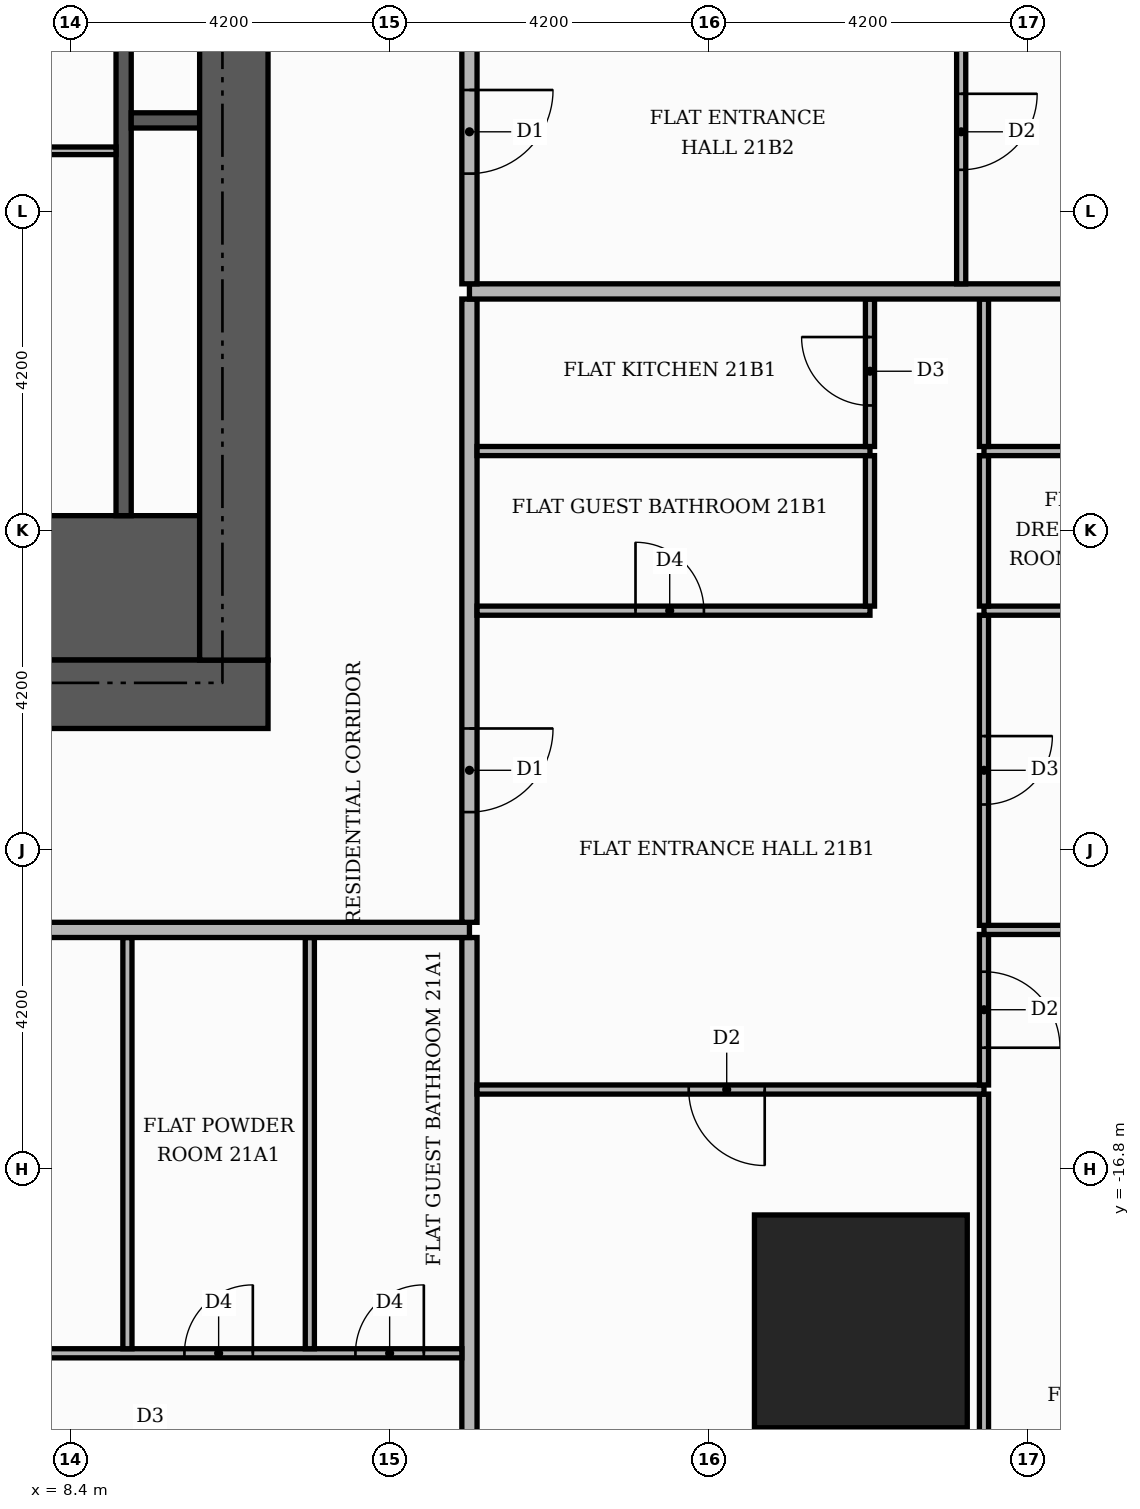
"""IFC4 building model, lengths in metres.
Left out: names, types, materials, properties, quantities, classifications, styles, units other than length and angle.
Written with IfcOpenShell. Run it as: python <this file> out.ifc"""

import sys

from ifc_helpers import new_model, si_unit, direction, frame, frame_2d, origin, origin_2d, place, context, subcontext, project, spatial, rectangle, extrude, element, fill, save


model = new_model("IFC4")
c1 = context("Model", 3, precision=1e-05, world=origin(), true_north=direction((0.0, 1.0)))
c2 = subcontext(c1, "Body", "Model", "MODEL_VIEW")
j1 = project(units=[si_unit("LENGTHUNIT", "METRE"), si_unit("PLANEANGLEUNIT", "RADIAN")], contexts=[c1])
p1 = place(None, origin())
s1 = spatial("IfcSite", under=j1, at=p1, CompositionType="ELEMENT")
p2 = place(p1, origin())
s2 = spatial("IfcBuilding", under=s1, at=p2, CompositionType="ELEMENT")
p3 = place(p2, frame((0.0, 0.0, 90.9)))
s3 = spatial("IfcBuildingStorey", under=s2, at=p3, CompositionType="ELEMENT", Elevation=90.9)
p4 = place(p3, frame((5.5, -9.15, 0.0), z_axis=(0.0, 0.0, 1.0), x_axis=(1.0, 0.0, 0.0)))
e1 = element("IfcWall", 1, at=p4, inside=s3, PredefinedType="SHEAR", context=c2, shape_type="SweptSolid", body=[
    extrude(rectangle(XDim=4.6, YDim=1.9, at=frame_2d((2.3, 0.0))), origin(), (0.0, 0.0, 1.0), 3.48),
])
p5 = place(p3, frame((9.1, -8.2, 0.0), z_axis=(0.0, 0.0, 1.0), x_axis=(0.0, 1.0, 0.0)))
e2 = element("IfcWall", 2, at=p5, inside=s3, PredefinedType="SHEAR", context=c2, shape_type="SweptSolid", body=[
    extrude(rectangle(XDim=16.4, YDim=0.2, at=frame_2d((8.2, 0.0))), origin(), (0.0, 0.0, 1.0), 3.48),
])
p6 = place(p3, frame((9.2, -3.0, 0.0), z_axis=(0.0, 0.0, 1.0), x_axis=(1.0, 0.0, 0.0)))
e3 = element("IfcWall", 3, at=p6, inside=s3, PredefinedType="SHEAR", context=c2, shape_type="SweptSolid", body=[
    extrude(rectangle(XDim=0.9, YDim=0.2, at=frame_2d((0.45, 0.0))), origin(), (0.0, 0.0, 1.0), 3.48),
])
p7 = place(p3, frame((-11.0, -10.55, 0.0), z_axis=(0.0, 0.0, 1.0), x_axis=(1.0, 0.0, 0.0)))
e4 = element("IfcWall", 4, at=p7, inside=s3, PredefinedType="SHEAR", context=c2, shape_type="SweptSolid", body=[
    extrude(rectangle(XDim=22.0, YDim=0.9, at=frame_2d((11.0, 0.0))), origin(), (0.0, 0.0, 1.0), 3.48),
])
p8 = place(p7, frame((7.4, 0.0, 0.0)))
e5 = element("IfcOpeningElement", 5, at=p8, cuts=e4, PredefinedType="OPENING", context=c2, shape_type="SweptSolid", body=[
    extrude(rectangle(XDim=1.8, YDim=2.2, at=frame_2d((0.9, 1.1))), frame((0.0, 0.46, 0.0), z_axis=(0.0, -1.0, 0.0), x_axis=(1.0, 0.0, 0.0)), (0.0, 0.0, 1.0), 0.92),
])
p9 = place(p3, frame((10.55, -10.1, 0.0), z_axis=(0.0, 0.0, 1.0), x_axis=(0.0, 1.0, 0.0)))
e6 = element("IfcWall", 6, at=p9, inside=s3, PredefinedType="SHEAR", context=c2, shape_type="SweptSolid", body=[
    extrude(rectangle(XDim=20.2, YDim=0.9, at=frame_2d((10.1, 0.0))), origin(), (0.0, 0.0, 1.0), 3.48),
])
p10 = place(p3, frame((18.8, -18.8, 0.0), z_axis=(0.0, 0.0, 1.0), x_axis=(1.0, 0.0, 0.0)))
e7 = element("IfcColumn", 7, at=p10, inside=s3, PredefinedType="COLUMN", context=c2, shape_type="SweptSolid", body=[
    extrude(rectangle(XDim=2.8, YDim=2.8, at=origin_2d()), origin(), (0.0, 0.0, 1.0), 3.9),
])
p11 = place(p3, frame((7.1, -3.4, 0.0), z_axis=(0.0, 0.0, 1.0), x_axis=(1.0, 0.0, 0.0)))
e8 = element("IfcWall", 8, at=p11, inside=s3, PredefinedType="PARTITIONING", context=c2, shape_type="SweptSolid", body=[
    extrude(rectangle(XDim=1.9, YDim=0.1, at=frame_2d((0.95, 0.0))), origin(), (0.0, 0.0, 1.0), 3.48),
])
p12 = place(p3, frame((13.65, -25.42, 0.0), z_axis=(0.0, 0.0, 1.0), x_axis=(0.0, 1.0, 0.0)))
e9 = element("IfcWall", 9, at=p12, inside=s3, PredefinedType="PARTITIONING", context=c2, shape_type="SweptSolid", body=[
    extrude(rectangle(XDim=11.67, YDim=0.2, at=frame_2d((5.835, 0.0))), origin(), (0.0, 0.0, 1.0), 3.48),
])
p13 = place(p3, frame((20.42, -25.42, 0.0), z_axis=(0.0, 0.0, 1.0), x_axis=(0.0, 1.0, 0.0)))
e10 = element("IfcWall", 10, at=p13, inside=s3, PredefinedType="PARTITIONING", context=c2, shape_type="SweptSolid", body=[
    extrude(rectangle(XDim=9.61, YDim=0.12, at=frame_2d((4.805, 0.0))), origin(), (0.0, 0.0, 1.0), 3.48),
])
p14 = place(p3, frame((-7.35, -19.22, 0.0), z_axis=(0.0, 0.0, 1.0), x_axis=(1.0, 0.0, 0.0)))
e11 = element("IfcWall", 11, at=p14, inside=s3, PredefinedType="PARTITIONING", context=c2, shape_type="SweptSolid", body=[
    extrude(rectangle(XDim=20.9, YDim=0.12, at=frame_2d((10.45, 0.0))), origin(), (0.0, 0.0, 1.0), 3.48),
])
p15 = place(p14, frame((2.7, 0.0, 0.0)))
e12 = element("IfcOpeningElement", 12, at=p15, cuts=e11, PredefinedType="OPENING", context=c2, shape_type="SweptSolid", body=[
    extrude(rectangle(XDim=0.9, YDim=2.1, at=frame_2d((0.45, 1.05))), frame((0.0, 0.07, 0.0), z_axis=(0.0, -1.0, 0.0), x_axis=(1.0, 0.0, 0.0)), (0.0, 0.0, 1.0), 0.14),
])
p16 = place(p14, frame((7.95, 0.0, 0.0)))
e13 = element("IfcOpeningElement", 13, at=p16, cuts=e11, PredefinedType="OPENING", context=c2, shape_type="SweptSolid", body=[
    extrude(rectangle(XDim=0.9, YDim=2.1, at=frame_2d((0.45, 1.05))), frame((0.0, 0.07, 0.0), z_axis=(0.0, -1.0, 0.0), x_axis=(1.0, 0.0, 0.0)), (0.0, 0.0, 1.0), 0.14),
])
p17 = place(p14, frame((13.05, 0.0, 0.0)))
e14 = element("IfcOpeningElement", 14, at=p17, cuts=e11, PredefinedType="OPENING", context=c2, shape_type="SweptSolid", body=[
    extrude(rectangle(XDim=0.9, YDim=2.1, at=frame_2d((0.45, 1.05))), frame((0.0, 0.07, 0.0), z_axis=(0.0, -1.0, 0.0), x_axis=(1.0, 0.0, 0.0)), (0.0, 0.0, 1.0), 0.14),
])
p18 = place(p14, frame((17.25, 0.0, 0.0)))
e15 = element("IfcOpeningElement", 15, at=p18, cuts=e11, PredefinedType="OPENING", context=c2, shape_type="SweptSolid", body=[
    extrude(rectangle(XDim=0.9, YDim=2.1, at=frame_2d((0.45, 1.05))), frame((0.0, 0.07, 0.0), z_axis=(0.0, -1.0, 0.0), x_axis=(1.0, 0.0, 0.0)), (0.0, 0.0, 1.0), 0.14),
])
p19 = place(p14, frame((19.5, 0.0, 0.0)))
e16 = element("IfcOpeningElement", 16, at=p19, cuts=e11, PredefinedType="OPENING", context=c2, shape_type="SweptSolid", body=[
    extrude(rectangle(XDim=0.9, YDim=2.1, at=frame_2d((0.45, 1.05))), frame((0.0, 0.07, 0.0), z_axis=(0.0, -1.0, 0.0), x_axis=(1.0, 0.0, 0.0)), (0.0, 0.0, 1.0), 0.14),
])
for number, where, z_axis, x_axis in (
    (17, (9.15, -19.16, 0.0), (0.0, 0.0, 1.0), (0.0, 1.0, 0.0)),
    (18, (11.55, -19.16, 0.0), (0.0, 0.0, 1.0), (0.0, 1.0, 0.0)),
):
    element("IfcWall", number, at=place(p3, frame(where, z_axis=z_axis, x_axis=x_axis)), inside=s3, PredefinedType="PARTITIONING", context=c2, shape_type="SweptSolid", body=[
        extrude(rectangle(XDim=5.41, YDim=0.12, at=frame_2d((2.705, 0.0))), origin(), (0.0, 0.0, 1.0), 3.48),
    ])
p20 = place(p3, frame((13.75, -15.75, 0.0), z_axis=(0.0, 0.0, 1.0), x_axis=(1.0, 0.0, 0.0)))
e19 = element("IfcWall", 19, at=p20, inside=s3, PredefinedType="PARTITIONING", context=c2, shape_type="SweptSolid", body=[
    extrude(rectangle(XDim=6.67, YDim=0.12, at=frame_2d((3.335, 0.0))), origin(), (0.0, 0.0, 1.0), 3.48),
])
p21 = place(p20, frame((2.785, 0.0, 0.0)))
e20 = element("IfcOpeningElement", 20, at=p21, cuts=e19, PredefinedType="OPENING", context=c2, shape_type="SweptSolid", body=[
    extrude(rectangle(XDim=1.0, YDim=2.1, at=frame_2d((0.5, 1.05))), frame((0.0, 0.07, 0.0), z_axis=(0.0, -1.0, 0.0), x_axis=(1.0, 0.0, 0.0)), (0.0, 0.0, 1.0), 0.14),
])
p22 = place(p3, frame((20.42, -15.69, 0.0), z_axis=(0.0, 0.0, 1.0), x_axis=(0.0, 1.0, 0.0)))
e21 = element("IfcWall", 21, at=p22, inside=s3, PredefinedType="PARTITIONING", context=c2, shape_type="SweptSolid", body=[
    extrude(rectangle(XDim=1.98, YDim=0.12, at=frame_2d((0.99, 0.0))), origin(), (0.0, 0.0, 1.0), 3.48),
])
p23 = place(p22, frame((0.49, 0.0, 0.0)))
e22 = element("IfcOpeningElement", 22, at=p23, cuts=e21, PredefinedType="OPENING", context=c2, shape_type="SweptSolid", body=[
    extrude(rectangle(XDim=1.0, YDim=2.1, at=frame_2d((0.5, 1.05))), frame((0.0, 0.07, 0.0), z_axis=(0.0, -1.0, 0.0), x_axis=(1.0, 0.0, 0.0)), (0.0, 0.0, 1.0), 0.14),
])
p24 = place(p3, frame((-25.42, -13.65, 0.0), z_axis=(0.0, 0.0, 1.0), x_axis=(1.0, 0.0, 0.0)))
e23 = element("IfcWall", 23, at=p24, inside=s3, PredefinedType="PARTITIONING", context=c2, shape_type="SweptSolid", body=[
    extrude(rectangle(XDim=39.07, YDim=0.2, at=frame_2d((19.535, 0.0))), origin(), (0.0, 0.0, 1.0), 3.48),
])
p25 = place(p24, frame((14.37, 0.0, 0.0)))
e24 = element("IfcOpeningElement", 24, at=p25, cuts=e23, PredefinedType="OPENING", context=c2, shape_type="SweptSolid", body=[
    extrude(rectangle(XDim=1.1, YDim=2.4, at=frame_2d((0.55, 1.2))), frame((0.0, 0.11, 0.0), z_axis=(0.0, -1.0, 0.0), x_axis=(1.0, 0.0, 0.0)), (0.0, 0.0, 1.0), 0.22),
])
p26 = place(p3, frame((20.42, -13.65, 0.0), z_axis=(0.0, 0.0, 1.0), x_axis=(1.0, 0.0, 0.0)))
e25 = element("IfcWall", 25, at=p26, inside=s3, PredefinedType="PARTITIONING", context=c2, shape_type="SweptSolid", body=[
    extrude(rectangle(XDim=5.0, YDim=0.12, at=frame_2d((2.5, 0.0))), origin(), (0.0, 0.0, 1.0), 3.48),
])
p27 = place(p3, frame((20.42, -13.59, 0.0), z_axis=(0.0, 0.0, 1.0), x_axis=(0.0, 1.0, 0.0)))
e26 = element("IfcWall", 26, at=p27, inside=s3, PredefinedType="PARTITIONING", context=c2, shape_type="SweptSolid", body=[
    extrude(rectangle(XDim=4.08, YDim=0.12, at=frame_2d((2.04, 0.0))), origin(), (0.0, 0.0, 1.0), 3.48),
])
p28 = place(p27, frame((1.59, 0.0, 0.0)))
e27 = element("IfcOpeningElement", 27, at=p28, cuts=e26, PredefinedType="OPENING", context=c2, shape_type="SweptSolid", body=[
    extrude(rectangle(XDim=0.9, YDim=2.1, at=frame_2d((0.45, 1.05))), frame((0.0, 0.07, 0.0), z_axis=(0.0, -1.0, 0.0), x_axis=(1.0, 0.0, 0.0)), (0.0, 0.0, 1.0), 0.14),
])
p29 = place(p3, frame((13.65, -13.55, 0.0), z_axis=(0.0, 0.0, 1.0), x_axis=(0.0, 1.0, 0.0)))
e28 = element("IfcWall", 28, at=p29, inside=s3, PredefinedType="PARTITIONING", context=c2, shape_type="SweptSolid", body=[
    extrude(rectangle(XDim=8.2, YDim=0.2, at=frame_2d((4.1, 0.0))), origin(), (0.0, 0.0, 1.0), 3.48),
])
p30 = place(p29, frame((1.45, 0.0, 0.0)))
e29 = element("IfcOpeningElement", 29, at=p30, cuts=e28, PredefinedType="OPENING", context=c2, shape_type="SweptSolid", body=[
    extrude(rectangle(XDim=1.1, YDim=2.4, at=frame_2d((0.55, 1.2))), frame((0.0, 0.11, 0.0), z_axis=(0.0, -1.0, 0.0), x_axis=(1.0, 0.0, 0.0)), (0.0, 0.0, 1.0), 0.22),
])
p31 = place(p3, frame((13.75, -9.45, 0.0), z_axis=(0.0, 0.0, 1.0), x_axis=(1.0, 0.0, 0.0)))
e30 = element("IfcWall", 30, at=p31, inside=s3, PredefinedType="PARTITIONING", context=c2, shape_type="SweptSolid", body=[
    extrude(rectangle(XDim=5.17, YDim=0.12, at=frame_2d((2.585, 0.0))), origin(), (0.0, 0.0, 1.0), 3.48),
])
p32 = place(p31, frame((2.085, 0.0, 0.0)))
e31 = element("IfcOpeningElement", 31, at=p32, cuts=e30, PredefinedType="OPENING", context=c2, shape_type="SweptSolid", body=[
    extrude(rectangle(XDim=0.9, YDim=2.1, at=frame_2d((0.45, 1.05))), frame((0.0, 0.07, 0.0), z_axis=(0.0, -1.0, 0.0), x_axis=(1.0, 0.0, 0.0)), (0.0, 0.0, 1.0), 0.14),
])
p33 = place(p3, frame((20.42, -9.45, 0.0), z_axis=(0.0, 0.0, 1.0), x_axis=(1.0, 0.0, 0.0)))
e32 = element("IfcWall", 32, at=p33, inside=s3, PredefinedType="PARTITIONING", context=c2, shape_type="SweptSolid", body=[
    extrude(rectangle(XDim=5.0, YDim=0.12, at=frame_2d((2.5, 0.0))), origin(), (0.0, 0.0, 1.0), 3.48),
])
p34 = place(p33, frame((2.2, 0.0, 0.0)))
e33 = element("IfcOpeningElement", 33, at=p34, cuts=e32, PredefinedType="OPENING", context=c2, shape_type="SweptSolid", body=[
    extrude(rectangle(XDim=0.9, YDim=2.1, at=frame_2d((0.45, 1.05))), frame((0.0, 0.07, 0.0), z_axis=(0.0, -1.0, 0.0), x_axis=(1.0, 0.0, 0.0)), (0.0, 0.0, 1.0), 0.14),
])
for number, where, z_axis, x_axis in (
    (34, (18.92, -9.39, 0.0), (0.0, 0.0, 1.0), (0.0, 1.0, 0.0)),
    (35, (20.42, -9.39, 0.0), (0.0, 0.0, 1.0), (0.0, 1.0, 0.0)),
):
    element("IfcWall", number, at=place(p3, frame(where, z_axis=z_axis, x_axis=x_axis)), inside=s3, PredefinedType="PARTITIONING", context=c2, shape_type="SweptSolid", body=[
        extrude(rectangle(XDim=1.98, YDim=0.12, at=frame_2d((0.99, 0.0))), origin(), (0.0, 0.0, 1.0), 3.48),
    ])
p35 = place(p3, frame((13.75, -7.35, 0.0), z_axis=(0.0, 0.0, 1.0), x_axis=(1.0, 0.0, 0.0)))
e36 = element("IfcWall", 36, at=p35, inside=s3, PredefinedType="PARTITIONING", context=c2, shape_type="SweptSolid", body=[
    extrude(rectangle(XDim=5.17, YDim=0.12, at=frame_2d((2.585, 0.0))), origin(), (0.0, 0.0, 1.0), 3.48),
])
p36 = place(p3, frame((20.42, -7.35, 0.0), z_axis=(0.0, 0.0, 1.0), x_axis=(1.0, 0.0, 0.0)))
e37 = element("IfcWall", 37, at=p36, inside=s3, PredefinedType="PARTITIONING", context=c2, shape_type="SweptSolid", body=[
    extrude(rectangle(XDim=5.0, YDim=0.12, at=frame_2d((2.5, 0.0))), origin(), (0.0, 0.0, 1.0), 3.48),
])
p37 = place(p36, frame((2.2, 0.0, 0.0)))
e38 = element("IfcOpeningElement", 38, at=p37, cuts=e37, PredefinedType="OPENING", context=c2, shape_type="SweptSolid", body=[
    extrude(rectangle(XDim=0.9, YDim=2.1, at=frame_2d((0.45, 1.05))), frame((0.0, 0.07, 0.0), z_axis=(0.0, -1.0, 0.0), x_axis=(1.0, 0.0, 0.0)), (0.0, 0.0, 1.0), 0.14),
])
p38 = place(p3, frame((18.92, -7.29, 0.0), z_axis=(0.0, 0.0, 1.0), x_axis=(0.0, 1.0, 0.0)))
e39 = element("IfcWall", 39, at=p38, inside=s3, PredefinedType="PARTITIONING", context=c2, shape_type="SweptSolid", body=[
    extrude(rectangle(XDim=1.94, YDim=0.12, at=frame_2d((0.97, 0.0))), origin(), (0.0, 0.0, 1.0), 3.48),
])
p39 = place(p38, frame((0.54, 0.0, 0.0)))
e40 = element("IfcOpeningElement", 40, at=p39, cuts=e39, PredefinedType="OPENING", context=c2, shape_type="SweptSolid", body=[
    extrude(rectangle(XDim=0.9, YDim=2.1, at=frame_2d((0.45, 1.05))), frame((0.0, 0.07, 0.0), z_axis=(0.0, -1.0, 0.0), x_axis=(1.0, 0.0, 0.0)), (0.0, 0.0, 1.0), 0.14),
])
p40 = place(p3, frame((20.42, -7.29, 0.0), z_axis=(0.0, 0.0, 1.0), x_axis=(0.0, 1.0, 0.0)))
e41 = element("IfcWall", 41, at=p40, inside=s3, PredefinedType="PARTITIONING", context=c2, shape_type="SweptSolid", body=[
    extrude(rectangle(XDim=1.94, YDim=0.12, at=frame_2d((0.97, 0.0))), origin(), (0.0, 0.0, 1.0), 3.48),
])
p41 = place(p3, frame((13.65, -5.25, 0.0), z_axis=(0.0, 0.0, 1.0), x_axis=(1.0, 0.0, 0.0)))
e42 = element("IfcWall", 42, at=p41, inside=s3, PredefinedType="PARTITIONING", context=c2, shape_type="SweptSolid", body=[
    extrude(rectangle(XDim=11.77, YDim=0.2, at=frame_2d((5.885, 0.0))), origin(), (0.0, 0.0, 1.0), 3.48),
])
p42 = place(p3, frame((13.65, -5.15, 0.0), z_axis=(0.0, 0.0, 1.0), x_axis=(0.0, 1.0, 0.0)))
e43 = element("IfcWall", 43, at=p42, inside=s3, PredefinedType="PARTITIONING", context=c2, shape_type="SweptSolid", body=[
    extrude(rectangle(XDim=18.7, YDim=0.2, at=frame_2d((9.35, 0.0))), origin(), (0.0, 0.0, 1.0), 3.48),
])
p43 = place(p42, frame((1.45, 0.0, 0.0)))
e44 = element("IfcOpeningElement", 44, at=p43, cuts=e43, PredefinedType="OPENING", context=c2, shape_type="SweptSolid", body=[
    extrude(rectangle(XDim=1.1, YDim=2.4, at=frame_2d((0.55, 1.2))), frame((0.0, 0.11, 0.0), z_axis=(0.0, -1.0, 0.0), x_axis=(1.0, 0.0, 0.0)), (0.0, 0.0, 1.0), 0.22),
])
p44 = place(p3, frame((20.12, -5.15, 0.0), z_axis=(0.0, 0.0, 1.0), x_axis=(0.0, 1.0, 0.0)))
e45 = element("IfcWall", 45, at=p44, inside=s3, PredefinedType="PARTITIONING", context=c2, shape_type="SweptSolid", body=[
    extrude(rectangle(XDim=4.04, YDim=0.12, at=frame_2d((2.02, 0.0))), origin(), (0.0, 0.0, 1.0), 3.48),
])
p45 = place(p44, frame((1.5, 0.0, 0.0)))
e46 = element("IfcOpeningElement", 46, at=p45, cuts=e45, PredefinedType="OPENING", context=c2, shape_type="SweptSolid", body=[
    extrude(rectangle(XDim=1.0, YDim=2.1, at=frame_2d((0.5, 1.05))), frame((0.0, 0.07, 0.0), z_axis=(0.0, -1.0, 0.0), x_axis=(1.0, 0.0, 0.0)), (0.0, 0.0, 1.0), 0.14),
])
p46 = place(p18, origin())
e47 = element("IfcDoor", 47, at=p46, inside=s3, OperationType="SINGLE_SWING_RIGHT", PredefinedType="DOOR", context=c2, shape_type="SweptSolid", body=[
    extrude(rectangle(XDim=0.9, YDim=2.1, at=frame_2d((0.45, 1.05))), frame((0.0, 0.025, 0.0), z_axis=(0.0, -1.0, 0.0), x_axis=(1.0, 0.0, 0.0)), (0.0, 0.0, 1.0), 0.05),
])
fill(e15, e47)
p47 = place(p19, origin())
e48 = element("IfcDoor", 48, at=p47, inside=s3, OperationType="SINGLE_SWING_RIGHT", PredefinedType="DOOR", context=c2, shape_type="SweptSolid", body=[
    extrude(rectangle(XDim=0.9, YDim=2.1, at=frame_2d((0.45, 1.05))), frame((0.0, 0.025, 0.0), z_axis=(0.0, -1.0, 0.0), x_axis=(1.0, 0.0, 0.0)), (0.0, 0.0, 1.0), 0.05),
])
fill(e16, e48)
p48 = place(p30, frame((1.1, 0.0, 0.0), z_axis=(0.0, 0.0, 1.0), x_axis=(-1.0, 0.0, 0.0)))
e49 = element("IfcDoor", 49, at=p48, inside=s3, OperationType="SINGLE_SWING_RIGHT", PredefinedType="DOOR", context=c2, shape_type="SweptSolid", body=[
    extrude(rectangle(XDim=1.1, YDim=2.4, at=frame_2d((0.55, 1.2))), frame((0.0, 0.025, 0.0), z_axis=(0.0, -1.0, 0.0), x_axis=(1.0, 0.0, 0.0)), (0.0, 0.0, 1.0), 0.05),
])
fill(e29, e49)
p49 = place(p21, frame((1.0, 0.0, 0.0), z_axis=(0.0, 0.0, 1.0), x_axis=(-1.0, 0.0, 0.0)))
e50 = element("IfcDoor", 50, at=p49, inside=s3, OperationType="SINGLE_SWING_RIGHT", PredefinedType="DOOR", context=c2, shape_type="SweptSolid", body=[
    extrude(rectangle(XDim=1.0, YDim=2.1, at=frame_2d((0.5, 1.05))), frame((0.0, 0.025, 0.0), z_axis=(0.0, -1.0, 0.0), x_axis=(1.0, 0.0, 0.0)), (0.0, 0.0, 1.0), 0.05),
])
fill(e20, e50)
p50 = place(p32, origin())
e51 = element("IfcDoor", 51, at=p50, inside=s3, OperationType="SINGLE_SWING_LEFT", PredefinedType="DOOR", context=c2, shape_type="SweptSolid", body=[
    extrude(rectangle(XDim=0.9, YDim=2.1, at=frame_2d((0.45, 1.05))), frame((0.0, 0.025, 0.0), z_axis=(0.0, -1.0, 0.0), x_axis=(1.0, 0.0, 0.0)), (0.0, 0.0, 1.0), 0.05),
])
fill(e31, e51)
p51 = place(p39, origin())
e52 = element("IfcDoor", 52, at=p51, inside=s3, OperationType="SINGLE_SWING_RIGHT", PredefinedType="DOOR", context=c2, shape_type="SweptSolid", body=[
    extrude(rectangle(XDim=0.9, YDim=2.1, at=frame_2d((0.45, 1.05))), frame((0.0, 0.025, 0.0), z_axis=(0.0, -1.0, 0.0), x_axis=(1.0, 0.0, 0.0)), (0.0, 0.0, 1.0), 0.05),
])
fill(e40, e52)
p52 = place(p23, frame((1.0, 0.0, 0.0), z_axis=(0.0, 0.0, 1.0), x_axis=(-1.0, 0.0, 0.0)))
e53 = element("IfcDoor", 53, at=p52, inside=s3, OperationType="SINGLE_SWING_LEFT", PredefinedType="DOOR", context=c2, shape_type="SweptSolid", body=[
    extrude(rectangle(XDim=1.0, YDim=2.1, at=frame_2d((0.5, 1.05))), frame((0.0, 0.025, 0.0), z_axis=(0.0, -1.0, 0.0), x_axis=(1.0, 0.0, 0.0)), (0.0, 0.0, 1.0), 0.05),
])
fill(e22, e53)
p53 = place(p28, frame((0.9, 0.0, 0.0), z_axis=(0.0, 0.0, 1.0), x_axis=(-1.0, 0.0, 0.0)))
e54 = element("IfcDoor", 54, at=p53, inside=s3, OperationType="SINGLE_SWING_RIGHT", PredefinedType="DOOR", context=c2, shape_type="SweptSolid", body=[
    extrude(rectangle(XDim=0.9, YDim=2.1, at=frame_2d((0.45, 1.05))), frame((0.0, 0.025, 0.0), z_axis=(0.0, -1.0, 0.0), x_axis=(1.0, 0.0, 0.0)), (0.0, 0.0, 1.0), 0.05),
])
fill(e27, e54)
p54 = place(p43, frame((1.1, 0.0, 0.0), z_axis=(0.0, 0.0, 1.0), x_axis=(-1.0, 0.0, 0.0)))
e55 = element("IfcDoor", 55, at=p54, inside=s3, OperationType="SINGLE_SWING_RIGHT", PredefinedType="DOOR", context=c2, shape_type="SweptSolid", body=[
    extrude(rectangle(XDim=1.1, YDim=2.4, at=frame_2d((0.55, 1.2))), frame((0.0, 0.025, 0.0), z_axis=(0.0, -1.0, 0.0), x_axis=(1.0, 0.0, 0.0)), (0.0, 0.0, 1.0), 0.05),
])
fill(e44, e55)
p55 = place(p45, frame((1.0, 0.0, 0.0), z_axis=(0.0, 0.0, 1.0), x_axis=(-1.0, 0.0, 0.0)))
e56 = element("IfcDoor", 56, at=p55, inside=s3, OperationType="SINGLE_SWING_RIGHT", PredefinedType="DOOR", context=c2, shape_type="SweptSolid", body=[
    extrude(rectangle(XDim=1.0, YDim=2.1, at=frame_2d((0.5, 1.05))), frame((0.0, 0.025, 0.0), z_axis=(0.0, -1.0, 0.0), x_axis=(1.0, 0.0, 0.0)), (0.0, 0.0, 1.0), 0.05),
])
fill(e46, e56)
save(model, sys.argv[1])
